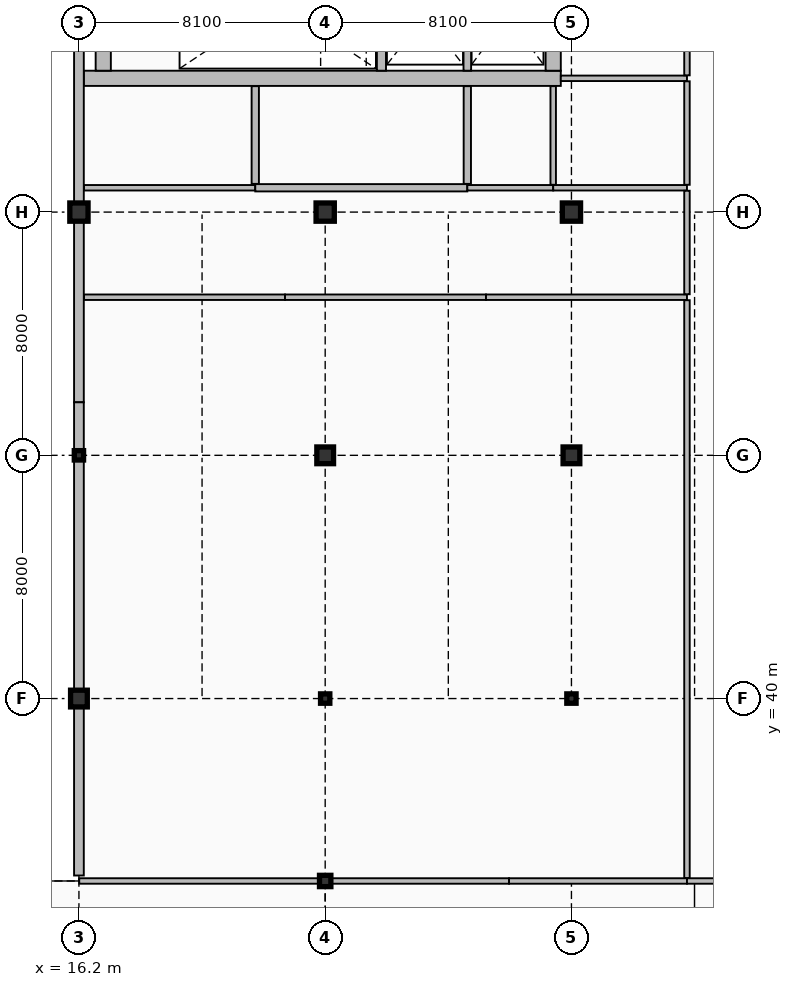
"""IFC4 building model, lengths in metres.
Left out: names, types, materials, properties, quantities, classifications, styles, units other than length and angle.
Written with IfcOpenShell. Run it as: python <this file> out.ifc"""

import sys

from ifc_helpers import new_model, si_unit, direction, frame, frame_2d, origin, origin_2d, place, context, subcontext, project, spatial, rectangle, i_section, extrude, element, fill, save


model = new_model("IFC4")
c1 = context("Model", 3, precision=1e-05, world=origin(), true_north=direction((0.0, 1.0)))
c2 = subcontext(c1, "Body", "Model", "MODEL_VIEW")
j1 = project(units=[si_unit("LENGTHUNIT", "METRE"), si_unit("PLANEANGLEUNIT", "RADIAN")], contexts=[c1])
p1 = place(None, origin())
s1 = spatial("IfcSite", under=j1, at=p1, CompositionType="ELEMENT")
p2 = place(p1, origin())
s2 = spatial("IfcBuilding", under=s1, at=p2, CompositionType="ELEMENT")
p3 = place(p2, frame((0.0, 0.0, 14.7)))
s3 = spatial("IfcBuildingStorey", under=s2, at=p3, CompositionType="ELEMENT", Elevation=14.7)
p4 = place(p3, frame((16.36, 60.4, 0.0), z_axis=(0.0, 0.0, 1.0), x_axis=(1.0, 0.0, 0.0)))
e1 = element("IfcWall", 1, at=p4, inside=s3, PredefinedType="SHEAR", context=c2, shape_type="SweptSolid", body=[
    extrude(rectangle(XDim=15.69, YDim=0.5, at=frame_2d((7.845, 0.0))), origin(), (0.0, 0.0, 1.0), 5.1),
])
p5 = place(p4, frame((1.39, 0.0, 0.0)))
e2 = element("IfcOpeningElement", 2, at=p5, cuts=e1, PredefinedType="OPENING", context=c2, shape_type="SweptSolid", body=[
    extrude(rectangle(XDim=1.15, YDim=2.25, at=frame_2d((0.575, 1.125))), frame((0.0, 0.26, 0.0), z_axis=(0.0, -1.0, 0.0), x_axis=(1.0, 0.0, 0.0)), (0.0, 0.0, 1.0), 0.52),
])
p6 = place(p4, frame((10.673, 0.0, 0.0)))
e3 = element("IfcOpeningElement", 3, at=p6, cuts=e1, PredefinedType="OPENING", context=c2, shape_type="SweptSolid", body=[
    extrude(rectangle(XDim=1.1, YDim=2.2, at=frame_2d((0.55, 1.1))), frame((0.0, 0.26, 0.0), z_axis=(0.0, -1.0, 0.0), x_axis=(1.0, 0.0, 0.0)), (0.0, 0.0, 1.0), 0.52),
])
p7 = place(p4, frame((13.387, 0.0, 0.0)))
e4 = element("IfcOpeningElement", 4, at=p7, cuts=e1, PredefinedType="OPENING", context=c2, shape_type="SweptSolid", body=[
    extrude(rectangle(XDim=1.1, YDim=2.2, at=frame_2d((0.55, 1.1))), frame((0.0, 0.26, 0.0), z_axis=(0.0, -1.0, 0.0), x_axis=(1.0, 0.0, 0.0)), (0.0, 0.0, 1.0), 0.52),
])
for number, where, z_axis, x_axis in (
    (5, (17.0, 60.65, 0.0), (0.0, 0.0, 1.0), (0.0, 1.0, 0.0)),
    (6, (31.8, 60.65, 0.0), (0.0, 0.0, 1.0), (0.0, 1.0, 0.0)),
):
    element("IfcWall", number, at=place(p3, frame(where, z_axis=z_axis, x_axis=x_axis)), inside=s3, PredefinedType="SHEAR", context=c2, shape_type="SweptSolid", body=[
        extrude(rectangle(XDim=7.9, YDim=0.5, at=frame_2d((3.95, 0.0))), origin(), (0.0, 0.0, 1.0), 5.1),
    ])
p8 = place(p3, frame((26.15, 60.65, 0.0), z_axis=(0.0, 0.0, 1.0), x_axis=(0.0, 1.0, 0.0)))
e7 = element("IfcWall", 7, at=p8, inside=s3, PredefinedType="SHEAR", context=c2, shape_type="SweptSolid", body=[
    extrude(rectangle(XDim=7.9, YDim=0.3, at=frame_2d((3.95, 0.0))), origin(), (0.0, 0.0, 1.0), 5.1),
])
p9 = place(p3, frame((28.975, 60.65, 0.0), z_axis=(0.0, 0.0, 1.0), x_axis=(0.0, 1.0, 0.0)))
e8 = element("IfcWall", 8, at=p9, inside=s3, PredefinedType="SHEAR", context=c2, shape_type="SweptSolid", body=[
    extrude(rectangle(XDim=7.9, YDim=0.25, at=frame_2d((3.95, 0.0))), origin(), (0.0, 0.0, 1.0), 5.1),
])
p10 = place(p3, frame((16.2, 40.0, 0.0), z_axis=(0.0, 0.0, 1.0), x_axis=(1.0, 0.0, 0.0)))
e9 = element("IfcColumn", 9, at=p10, inside=s3, PredefinedType="COLUMN", context=c2, shape_type="SweptSolid", body=[
    extrude(rectangle(XDim=0.55, YDim=0.55, at=origin_2d()), origin(), (0.0, 0.0, 1.0), 5.1),
])
p11 = place(p3, frame((16.2, 48.0, 0.0), z_axis=(0.0, 0.0, 1.0), x_axis=(1.0, 0.0, 0.0)))
e10 = element("IfcColumn", 10, at=p11, inside=s3, PredefinedType="COLUMN", context=c2, shape_type="SweptSolid", body=[
    extrude(i_section(OverallWidth=0.305, OverallDepth=0.308, WebThickness=0.01, FlangeThickness=0.015, FilletRadius=0.015, at=origin_2d()), origin(), (0.0, 0.0, 1.0), 5.1),
])
p12 = place(p3, frame((16.2, 56.0, 0.0), z_axis=(0.0, 0.0, 1.0), x_axis=(1.0, 0.0, 0.0)))
e11 = element("IfcColumn", 11, at=p12, inside=s3, PredefinedType="COLUMN", context=c2, shape_type="SweptSolid", body=[
    extrude(rectangle(XDim=0.6, YDim=0.6, at=origin_2d()), origin(), (0.0, 0.0, 1.0), 5.1),
])
p13 = place(p3, frame((24.3, 34.0, 0.0), z_axis=(0.0, 0.0, 1.0), x_axis=(1.0, 0.0, 0.0)))
e12 = element("IfcColumn", 12, at=p13, inside=s3, PredefinedType="COLUMN", context=c2, shape_type="SweptSolid", body=[
    extrude(i_section(OverallWidth=0.374, OverallDepth=0.372, WebThickness=0.016, FlangeThickness=0.026, FilletRadius=0.016, at=origin_2d()), origin(), (0.0, 0.0, 1.0), 5.1),
])
p14 = place(p3, frame((24.3, 40.0, 0.0), z_axis=(0.0, 0.0, 1.0), x_axis=(1.0, 0.0, 0.0)))
e13 = element("IfcColumn", 13, at=p14, inside=s3, PredefinedType="COLUMN", context=c2, shape_type="SweptSolid", body=[
    extrude(i_section(OverallWidth=0.305, OverallDepth=0.308, WebThickness=0.01, FlangeThickness=0.015, FilletRadius=0.015, at=origin_2d()), origin(), (0.0, 0.0, 1.0), 5.1),
])
p15 = place(p3, frame((24.3, 48.0, 0.0), z_axis=(0.0, 0.0, 1.0), x_axis=(1.0, 0.0, 0.0)))
e14 = element("IfcColumn", 14, at=p15, inside=s3, PredefinedType="COLUMN", context=c2, shape_type="SweptSolid", body=[
    extrude(rectangle(XDim=0.55, YDim=0.55, at=origin_2d()), origin(), (0.0, 0.0, 1.0), 5.1),
])
p16 = place(p3, frame((24.3, 56.0, 0.0), z_axis=(0.0, 0.0, 1.0), x_axis=(1.0, 0.0, 0.0)))
e15 = element("IfcColumn", 15, at=p16, inside=s3, PredefinedType="COLUMN", context=c2, shape_type="SweptSolid", body=[
    extrude(rectangle(XDim=0.6, YDim=0.6, at=origin_2d()), origin(), (0.0, 0.0, 1.0), 5.1),
])
p17 = place(p3, frame((32.4, 40.0, 0.0), z_axis=(0.0, 0.0, 1.0), x_axis=(1.0, 0.0, 0.0)))
e16 = element("IfcColumn", 16, at=p17, inside=s3, PredefinedType="COLUMN", context=c2, shape_type="SweptSolid", body=[
    extrude(i_section(OverallWidth=0.305, OverallDepth=0.308, WebThickness=0.01, FlangeThickness=0.015, FilletRadius=0.015, at=origin_2d()), origin(), (0.0, 0.0, 1.0), 5.1),
])
p18 = place(p3, frame((32.4, 48.0, 0.0), z_axis=(0.0, 0.0, 1.0), x_axis=(1.0, 0.0, 0.0)))
e17 = element("IfcColumn", 17, at=p18, inside=s3, PredefinedType="COLUMN", context=c2, shape_type="SweptSolid", body=[
    extrude(rectangle(XDim=0.55, YDim=0.55, at=origin_2d()), origin(), (0.0, 0.0, 1.0), 5.1),
])
p19 = place(p3, frame((32.4, 56.0, 0.0), z_axis=(0.0, 0.0, 1.0), x_axis=(1.0, 0.0, 0.0)))
e18 = element("IfcColumn", 18, at=p19, inside=s3, PredefinedType="COLUMN", context=c2, shape_type="SweptSolid", body=[
    extrude(rectangle(XDim=0.6, YDim=0.6, at=origin_2d()), origin(), (0.0, 0.0, 1.0), 5.1),
])
p20 = place(p3, frame((16.2, 65.308, 0.0), z_axis=(0.0, 0.0, 1.0), x_axis=(0.0, -1.0, 0.0)))
e19 = element("IfcWall", 19, at=p20, inside=s3, PredefinedType="SOLIDWALL", context=c2, shape_type="SweptSolid", body=[
    extrude(rectangle(XDim=15.564, YDim=0.32, at=frame_2d((7.782, 0.0))), origin(), (0.0, 0.0, 1.0), 4.332),
])
p21 = place(p3, frame((16.2, 49.744, 0.0), z_axis=(0.0, 0.0, 1.0), x_axis=(0.0, -1.0, 0.0)))
e20 = element("IfcWall", 20, at=p21, inside=s3, PredefinedType="SOLIDWALL", context=c2, shape_type="SweptSolid", body=[
    extrude(rectangle(XDim=15.564, YDim=0.32, at=frame_2d((7.782, 0.0))), origin(), (0.0, 0.0, 1.0), 4.332),
])
p22 = place(p21, frame((7.65, 0.0, 0.95)))
e21 = element("IfcOpeningElement", 21, at=p22, cuts=e20, PredefinedType="OPENING", context=c2, shape_type="SweptSolid", body=[
    extrude(rectangle(XDim=0.6, YDim=1.8, at=frame_2d((0.3, 0.9))), frame((0.0, 0.17, 0.0), z_axis=(0.0, -1.0, 0.0), x_axis=(1.0, 0.0, 0.0)), (0.0, 0.0, 1.0), 0.34),
])
p23 = place(p3, frame((16.21, 34.0, 0.0), z_axis=(0.0, 0.0, 1.0), x_axis=(1.0, 0.0, 0.0)))
e22 = element("IfcWall", 22, at=p23, inside=s3, PredefinedType="PARTITIONING", context=c2, shape_type="SweptSolid", body=[
    extrude(rectangle(XDim=7.895, YDim=0.18, at=frame_2d((3.948, 0.0))), origin(), (0.0, 0.0, 1.0), 4.22),
])
p24 = place(p3, frame((24.495, 34.0, 0.0), z_axis=(0.0, 0.0, 1.0), x_axis=(1.0, 0.0, 0.0)))
e23 = element("IfcWall", 23, at=p24, inside=s3, PredefinedType="PARTITIONING", context=c2, shape_type="SweptSolid", body=[
    extrude(rectangle(XDim=5.852, YDim=0.18, at=frame_2d((2.926, 0.0))), origin(), (0.0, 0.0, 1.0), 4.144),
])
p25 = place(p3, frame((30.347, 34.0, 0.0), z_axis=(0.0, 0.0, 1.0), x_axis=(1.0, 0.0, 0.0)))
e24 = element("IfcWall", 24, at=p25, inside=s3, PredefinedType="PARTITIONING", context=c2, shape_type="SweptSolid", body=[
    extrude(rectangle(XDim=5.853, YDim=0.18, at=frame_2d((2.926, 0.0))), origin(), (0.0, 0.0, 1.0), 4.144),
])
p26 = place(p3, frame((16.368, 53.2, 0.0), z_axis=(0.0, 0.0, 1.0), x_axis=(1.0, 0.0, 0.0)))
e25 = element("IfcWall", 25, at=p26, inside=s3, PredefinedType="PARTITIONING", context=c2, shape_type="SweptSolid", body=[
    extrude(rectangle(XDim=6.611, YDim=0.18, at=frame_2d((3.305, 0.0))), origin(), (0.0, 0.0, 1.0), 4.84),
])
for number, where, z_axis, x_axis in (
    (26, (22.979, 53.2, 0.0), (0.0, 0.0, 1.0), (1.0, 0.0, 0.0)),
    (27, (29.589, 53.2, 0.0), (0.0, 0.0, 1.0), (1.0, 0.0, 0.0)),
):
    element("IfcWall", number, at=place(p3, frame(where, z_axis=z_axis, x_axis=x_axis)), inside=s3, PredefinedType="PARTITIONING", context=c2, shape_type="SweptSolid", body=[
        extrude(rectangle(XDim=6.611, YDim=0.18, at=frame_2d((3.305, 0.0))), origin(), (0.0, 0.0, 1.0), 4.84),
    ])
p27 = place(p3, frame((16.368, 56.8, 0.0), z_axis=(0.0, 0.0, 1.0), x_axis=(1.0, 0.0, 0.0)))
e28 = element("IfcWall", 28, at=p27, inside=s3, PredefinedType="PARTITIONING", context=c2, shape_type="SweptSolid", body=[
    extrude(rectangle(XDim=5.632, YDim=0.18, at=frame_2d((2.816, 0.0))), origin(), (0.0, 0.0, 1.0), 4.84),
])
p28 = place(p27, frame((2.266, 0.0, 0.0)))
e29 = element("IfcOpeningElement", 29, at=p28, cuts=e28, PredefinedType="OPENING", context=c2, shape_type="SweptSolid", body=[
    extrude(rectangle(XDim=1.1, YDim=2.2, at=frame_2d((0.55, 1.1))), frame((0.0, 0.1, 0.0), z_axis=(0.0, -1.0, 0.0), x_axis=(1.0, 0.0, 0.0)), (0.0, 0.0, 1.0), 0.2),
])
p29 = place(p3, frame((22.0, 56.8, 0.0), z_axis=(0.0, 0.0, 1.0), x_axis=(1.0, 0.0, 0.0)))
e30 = element("IfcWall", 30, at=p29, inside=s3, PredefinedType="PARTITIONING", context=c2, shape_type="SweptSolid", body=[
    extrude(rectangle(XDim=6.975, YDim=0.24, at=frame_2d((3.488, 0.0))), origin(), (0.0, 0.0, 1.0), 4.84),
])
p30 = place(p29, frame((4.003, 0.0, 0.0)))
e31 = element("IfcOpeningElement", 31, at=p30, cuts=e30, PredefinedType="OPENING", context=c2, shape_type="SweptSolid", body=[
    extrude(rectangle(XDim=1.2, YDim=2.3, at=frame_2d((0.6, 1.15))), frame((0.0, 0.13, 0.0), z_axis=(0.0, -1.0, 0.0), x_axis=(1.0, 0.0, 0.0)), (0.0, 0.0, 1.0), 0.26),
])
p31 = place(p3, frame((28.975, 56.8, 0.0), z_axis=(0.0, 0.0, 1.0), x_axis=(1.0, 0.0, 0.0)))
e32 = element("IfcWall", 32, at=p31, inside=s3, PredefinedType="PARTITIONING", context=c2, shape_type="SweptSolid", body=[
    extrude(rectangle(XDim=2.825, YDim=0.18, at=frame_2d((1.413, 0.0))), origin(), (0.0, 0.0, 1.0), 4.84),
])
p32 = place(p31, frame((0.636, 0.0, 0.0)))
e33 = element("IfcOpeningElement", 33, at=p32, cuts=e32, PredefinedType="OPENING", context=c2, shape_type="SweptSolid", body=[
    extrude(rectangle(XDim=1.1, YDim=2.2, at=frame_2d((0.55, 1.1))), frame((0.0, 0.1, 0.0), z_axis=(0.0, -1.0, 0.0), x_axis=(1.0, 0.0, 0.0)), (0.0, 0.0, 1.0), 0.2),
])
p33 = place(p3, frame((31.8, 56.8, 0.0), z_axis=(0.0, 0.0, 1.0), x_axis=(1.0, 0.0, 0.0)))
e34 = element("IfcWall", 34, at=p33, inside=s3, PredefinedType="PARTITIONING", context=c2, shape_type="SweptSolid", body=[
    extrude(rectangle(XDim=4.4, YDim=0.18, at=frame_2d((2.2, 0.0))), origin(), (0.0, 0.0, 1.0), 4.84),
])
p34 = place(p3, frame((32.05, 60.4, 0.0), z_axis=(0.0, 0.0, 1.0), x_axis=(1.0, 0.0, 0.0)))
e35 = element("IfcWall", 35, at=p34, inside=s3, PredefinedType="PARTITIONING", context=c2, shape_type="SweptSolid", body=[
    extrude(rectangle(XDim=4.15, YDim=0.18, at=frame_2d((2.075, 0.0))), origin(), (0.0, 0.0, 1.0), 4.84),
])
p35 = place(p3, frame((36.2, 34.0, 0.0), z_axis=(0.0, 0.0, 1.0), x_axis=(1.0, 0.0, 0.0)))
e36 = element("IfcWall", 36, at=p35, inside=s3, PredefinedType="PARTITIONING", context=c2, shape_type="SweptSolid", body=[
    extrude(rectangle(XDim=4.3, YDim=0.18, at=frame_2d((2.15, 0.0))), origin(), (0.0, 0.0, 1.0), 4.144),
])
p36 = place(p35, frame((1.55, 0.0, 0.0)))
e37 = element("IfcOpeningElement", 37, at=p36, cuts=e36, PredefinedType="OPENING", context=c2, shape_type="SweptSolid", body=[
    extrude(rectangle(XDim=1.2, YDim=2.2, at=frame_2d((0.6, 1.1))), frame((0.0, 0.1, 0.0), z_axis=(0.0, -1.0, 0.0), x_axis=(1.0, 0.0, 0.0)), (0.0, 0.0, 1.0), 0.2),
])
p37 = place(p3, frame((22.0, 56.928, 0.0), z_axis=(0.0, 0.0, 1.0), x_axis=(0.0, 1.0, 0.0)))
e38 = element("IfcWall", 38, at=p37, inside=s3, PredefinedType="PARTITIONING", context=c2, shape_type="SweptSolid", body=[
    extrude(rectangle(XDim=3.214, YDim=0.24, at=frame_2d((1.607, 0.0))), origin(), (0.0, 0.0, 1.0), 4.84),
])
p38 = place(p37, frame((1.107, 0.0, 0.0)))
e39 = element("IfcOpeningElement", 39, at=p38, cuts=e38, PredefinedType="OPENING", context=c2, shape_type="SweptSolid", body=[
    extrude(rectangle(XDim=1.0, YDim=2.2, at=frame_2d((0.5, 1.1))), frame((0.0, 0.13, 0.0), z_axis=(0.0, -1.0, 0.0), x_axis=(1.0, 0.0, 0.0)), (0.0, 0.0, 1.0), 0.26),
])
p39 = place(p3, frame((28.975, 56.928, 0.0), z_axis=(0.0, 0.0, 1.0), x_axis=(0.0, 1.0, 0.0)))
e40 = element("IfcWall", 40, at=p39, inside=s3, PredefinedType="PARTITIONING", context=c2, shape_type="SweptSolid", body=[
    extrude(rectangle(XDim=3.214, YDim=0.24, at=frame_2d((1.607, 0.0))), origin(), (0.0, 0.0, 1.0), 4.84),
])
p40 = place(p3, frame((31.8, 56.898, 0.0), z_axis=(0.0, 0.0, 1.0), x_axis=(0.0, 1.0, 0.0)))
e41 = element("IfcWall", 41, at=p40, inside=s3, PredefinedType="PARTITIONING", context=c2, shape_type="SweptSolid", body=[
    extrude(rectangle(XDim=3.244, YDim=0.18, at=frame_2d((1.622, 0.0))), origin(), (0.0, 0.0, 1.0), 4.84),
])
p41 = place(p3, frame((36.2, 34.098, 0.0), z_axis=(0.0, 0.0, 1.0), x_axis=(0.0, 1.0, 0.0)))
e42 = element("IfcWall", 42, at=p41, inside=s3, PredefinedType="PARTITIONING", context=c2, shape_type="SweptSolid", body=[
    extrude(rectangle(XDim=19.004, YDim=0.18, at=frame_2d((9.502, 0.0))), origin(), (0.0, 0.0, 1.0), 4.425),
])
p42 = place(p41, frame((8.952, 0.0, 0.0)))
e43 = element("IfcOpeningElement", 43, at=p42, cuts=e42, PredefinedType="OPENING", context=c2, shape_type="SweptSolid", body=[
    extrude(rectangle(XDim=1.1, YDim=2.2, at=frame_2d((0.55, 1.1))), frame((0.0, 0.1, 0.0), z_axis=(0.0, -1.0, 0.0), x_axis=(1.0, 0.0, 0.0)), (0.0, 0.0, 1.0), 0.2),
])
p43 = place(p3, frame((36.2, 53.298, 0.0), z_axis=(0.0, 0.0, 1.0), x_axis=(0.0, 1.0, 0.0)))
e44 = element("IfcWall", 44, at=p43, inside=s3, PredefinedType="PARTITIONING", context=c2, shape_type="SweptSolid", body=[
    extrude(rectangle(XDim=3.404, YDim=0.18, at=frame_2d((1.702, 0.0))), origin(), (0.0, 0.0, 1.0), 4.425),
])
p44 = place(p43, frame((1.152, 0.0, 0.0)))
e45 = element("IfcOpeningElement", 45, at=p44, cuts=e44, PredefinedType="OPENING", context=c2, shape_type="SweptSolid", body=[
    extrude(rectangle(XDim=1.1, YDim=2.2, at=frame_2d((0.55, 1.1))), frame((0.0, 0.1, 0.0), z_axis=(0.0, -1.0, 0.0), x_axis=(1.0, 0.0, 0.0)), (0.0, 0.0, 1.0), 0.2),
])
p45 = place(p3, frame((36.2, 56.898, 0.0), z_axis=(0.0, 0.0, 1.0), x_axis=(0.0, 1.0, 0.0)))
e46 = element("IfcWall", 46, at=p45, inside=s3, PredefinedType="PARTITIONING", context=c2, shape_type="SweptSolid", body=[
    extrude(rectangle(XDim=3.404, YDim=0.18, at=frame_2d((1.702, 0.0))), origin(), (0.0, 0.0, 1.0), 4.84),
])
p46 = place(p45, frame((1.202, 0.0, 0.0)))
e47 = element("IfcOpeningElement", 47, at=p46, cuts=e46, PredefinedType="OPENING", context=c2, shape_type="SweptSolid", body=[
    extrude(rectangle(XDim=1.0, YDim=2.15, at=frame_2d((0.5, 1.075))), frame((0.0, 0.1, 0.0), z_axis=(0.0, -1.0, 0.0), x_axis=(1.0, 0.0, 0.0)), (0.0, 0.0, 1.0), 0.2),
])
p47 = place(p3, frame((36.2, 60.498, 0.0), z_axis=(0.0, 0.0, 1.0), x_axis=(0.0, 1.0, 0.0)))
e48 = element("IfcWall", 48, at=p47, inside=s3, PredefinedType="PARTITIONING", context=c2, shape_type="SweptSolid", body=[
    extrude(rectangle(XDim=2.614, YDim=0.18, at=frame_2d((1.307, 0.0))), origin(), (0.0, 0.0, 1.0), 4.84),
])
p48 = place(p47, frame((0.832, 0.0, 0.0)))
e49 = element("IfcOpeningElement", 49, at=p48, cuts=e48, PredefinedType="OPENING", context=c2, shape_type="SweptSolid", body=[
    extrude(rectangle(XDim=0.95, YDim=2.1, at=frame_2d((0.475, 1.05))), frame((0.0, 0.1, 0.0), z_axis=(0.0, -1.0, 0.0), x_axis=(1.0, 0.0, 0.0)), (0.0, 0.0, 1.0), 0.2),
])
p49 = place(p22, origin())
e50 = element("IfcWindow", 50, at=p49, inside=s3, PartitioningType="SINGLE_PANEL", PredefinedType="WINDOW", context=c2, shape_type="SweptSolid", body=[
    extrude(rectangle(XDim=0.6, YDim=1.8, at=frame_2d((0.3, 0.9))), frame((0.0, 0.03, 0.0), z_axis=(0.0, -1.0, 0.0), x_axis=(1.0, 0.0, 0.0)), (0.0, 0.0, 1.0), 0.06),
])
fill(e21, e50)
p50 = place(p5, origin())
e51 = element("IfcDoor", 51, at=p50, inside=s3, OperationType="SINGLE_SWING_LEFT", PredefinedType="DOOR", context=c2, shape_type="SweptSolid", body=[
    extrude(rectangle(XDim=1.15, YDim=2.25, at=frame_2d((0.575, 1.125))), frame((0.0, 0.025, 0.0), z_axis=(0.0, -1.0, 0.0), x_axis=(1.0, 0.0, 0.0)), (0.0, 0.0, 1.0), 0.05),
])
fill(e2, e51)
p51 = place(p6, frame((1.1, 0.0, 0.0), z_axis=(0.0, 0.0, 1.0), x_axis=(-1.0, 0.0, 0.0)))
e52 = element("IfcDoor", 52, at=p51, inside=s3, OperationType="DOUBLE_DOOR_SLIDING", PredefinedType="DOOR", context=c2, shape_type="SweptSolid", body=[
    extrude(rectangle(XDim=1.1, YDim=2.2, at=frame_2d((0.55, 1.1))), frame((0.0, 0.025, 0.0), z_axis=(0.0, -1.0, 0.0), x_axis=(1.0, 0.0, 0.0)), (0.0, 0.0, 1.0), 0.05),
])
fill(e3, e52)
p52 = place(p7, frame((1.1, 0.0, 0.0), z_axis=(0.0, 0.0, 1.0), x_axis=(-1.0, 0.0, 0.0)))
e53 = element("IfcDoor", 53, at=p52, inside=s3, OperationType="DOUBLE_DOOR_SLIDING", PredefinedType="DOOR", context=c2, shape_type="SweptSolid", body=[
    extrude(rectangle(XDim=1.1, YDim=2.2, at=frame_2d((0.55, 1.1))), frame((0.0, 0.025, 0.0), z_axis=(0.0, -1.0, 0.0), x_axis=(1.0, 0.0, 0.0)), (0.0, 0.0, 1.0), 0.05),
])
fill(e4, e53)
p53 = place(p28, frame((1.1, 0.0, 0.0), z_axis=(0.0, 0.0, 1.0), x_axis=(-1.0, 0.0, 0.0)))
e54 = element("IfcDoor", 54, at=p53, inside=s3, OperationType="SINGLE_SWING_LEFT", PredefinedType="DOOR", context=c2, shape_type="SweptSolid", body=[
    extrude(rectangle(XDim=1.1, YDim=2.2, at=frame_2d((0.55, 1.1))), frame((0.0, 0.025, 0.0), z_axis=(0.0, -1.0, 0.0), x_axis=(1.0, 0.0, 0.0)), (0.0, 0.0, 1.0), 0.05),
])
fill(e29, e54)
p54 = place(p30, frame((1.2, 0.0, 0.0), z_axis=(0.0, 0.0, 1.0), x_axis=(-1.0, 0.0, 0.0)))
e55 = element("IfcDoor", 55, at=p54, inside=s3, OperationType="SINGLE_SWING_RIGHT", PredefinedType="DOOR", context=c2, shape_type="SweptSolid", body=[
    extrude(rectangle(XDim=1.2, YDim=2.3, at=frame_2d((0.6, 1.15))), frame((0.0, 0.025, 0.0), z_axis=(0.0, -1.0, 0.0), x_axis=(1.0, 0.0, 0.0)), (0.0, 0.0, 1.0), 0.05),
])
fill(e31, e55)
p55 = place(p32, frame((1.1, 0.0, 0.0), z_axis=(0.0, 0.0, 1.0), x_axis=(-1.0, 0.0, 0.0)))
e56 = element("IfcDoor", 56, at=p55, inside=s3, OperationType="SINGLE_SWING_RIGHT", PredefinedType="DOOR", context=c2, shape_type="SweptSolid", body=[
    extrude(rectangle(XDim=1.1, YDim=2.2, at=frame_2d((0.55, 1.1))), frame((0.0, 0.025, 0.0), z_axis=(0.0, -1.0, 0.0), x_axis=(1.0, 0.0, 0.0)), (0.0, 0.0, 1.0), 0.05),
])
fill(e33, e56)
p56 = place(p38, origin())
e57 = element("IfcDoor", 57, at=p56, inside=s3, OperationType="SINGLE_SWING_LEFT", PredefinedType="DOOR", context=c2, shape_type="SweptSolid", body=[
    extrude(rectangle(XDim=1.0, YDim=2.2, at=frame_2d((0.5, 1.1))), frame((0.0, 0.025, 0.0), z_axis=(0.0, -1.0, 0.0), x_axis=(1.0, 0.0, 0.0)), (0.0, 0.0, 1.0), 0.05),
])
fill(e39, e57)
p57 = place(p42, origin())
e58 = element("IfcDoor", 58, at=p57, inside=s3, OperationType="SINGLE_SWING_RIGHT", PredefinedType="DOOR", context=c2, shape_type="SweptSolid", body=[
    extrude(rectangle(XDim=1.1, YDim=2.2, at=frame_2d((0.55, 1.1))), frame((0.0, 0.025, 0.0), z_axis=(0.0, -1.0, 0.0), x_axis=(1.0, 0.0, 0.0)), (0.0, 0.0, 1.0), 0.05),
])
fill(e43, e58)
p58 = place(p44, origin())
e59 = element("IfcDoor", 59, at=p58, inside=s3, OperationType="SINGLE_SWING_LEFT", PredefinedType="DOOR", context=c2, shape_type="SweptSolid", body=[
    extrude(rectangle(XDim=1.1, YDim=2.2, at=frame_2d((0.55, 1.1))), frame((0.0, 0.025, 0.0), z_axis=(0.0, -1.0, 0.0), x_axis=(1.0, 0.0, 0.0)), (0.0, 0.0, 1.0), 0.05),
])
fill(e45, e59)
p59 = place(p46, origin())
e60 = element("IfcDoor", 60, at=p59, inside=s3, OperationType="SINGLE_SWING_RIGHT", PredefinedType="DOOR", context=c2, shape_type="SweptSolid", body=[
    extrude(rectangle(XDim=1.0, YDim=2.15, at=frame_2d((0.5, 1.075))), frame((0.0, 0.025, 0.0), z_axis=(0.0, -1.0, 0.0), x_axis=(1.0, 0.0, 0.0)), (0.0, 0.0, 1.0), 0.05),
])
fill(e47, e60)
save(model, sys.argv[1])
